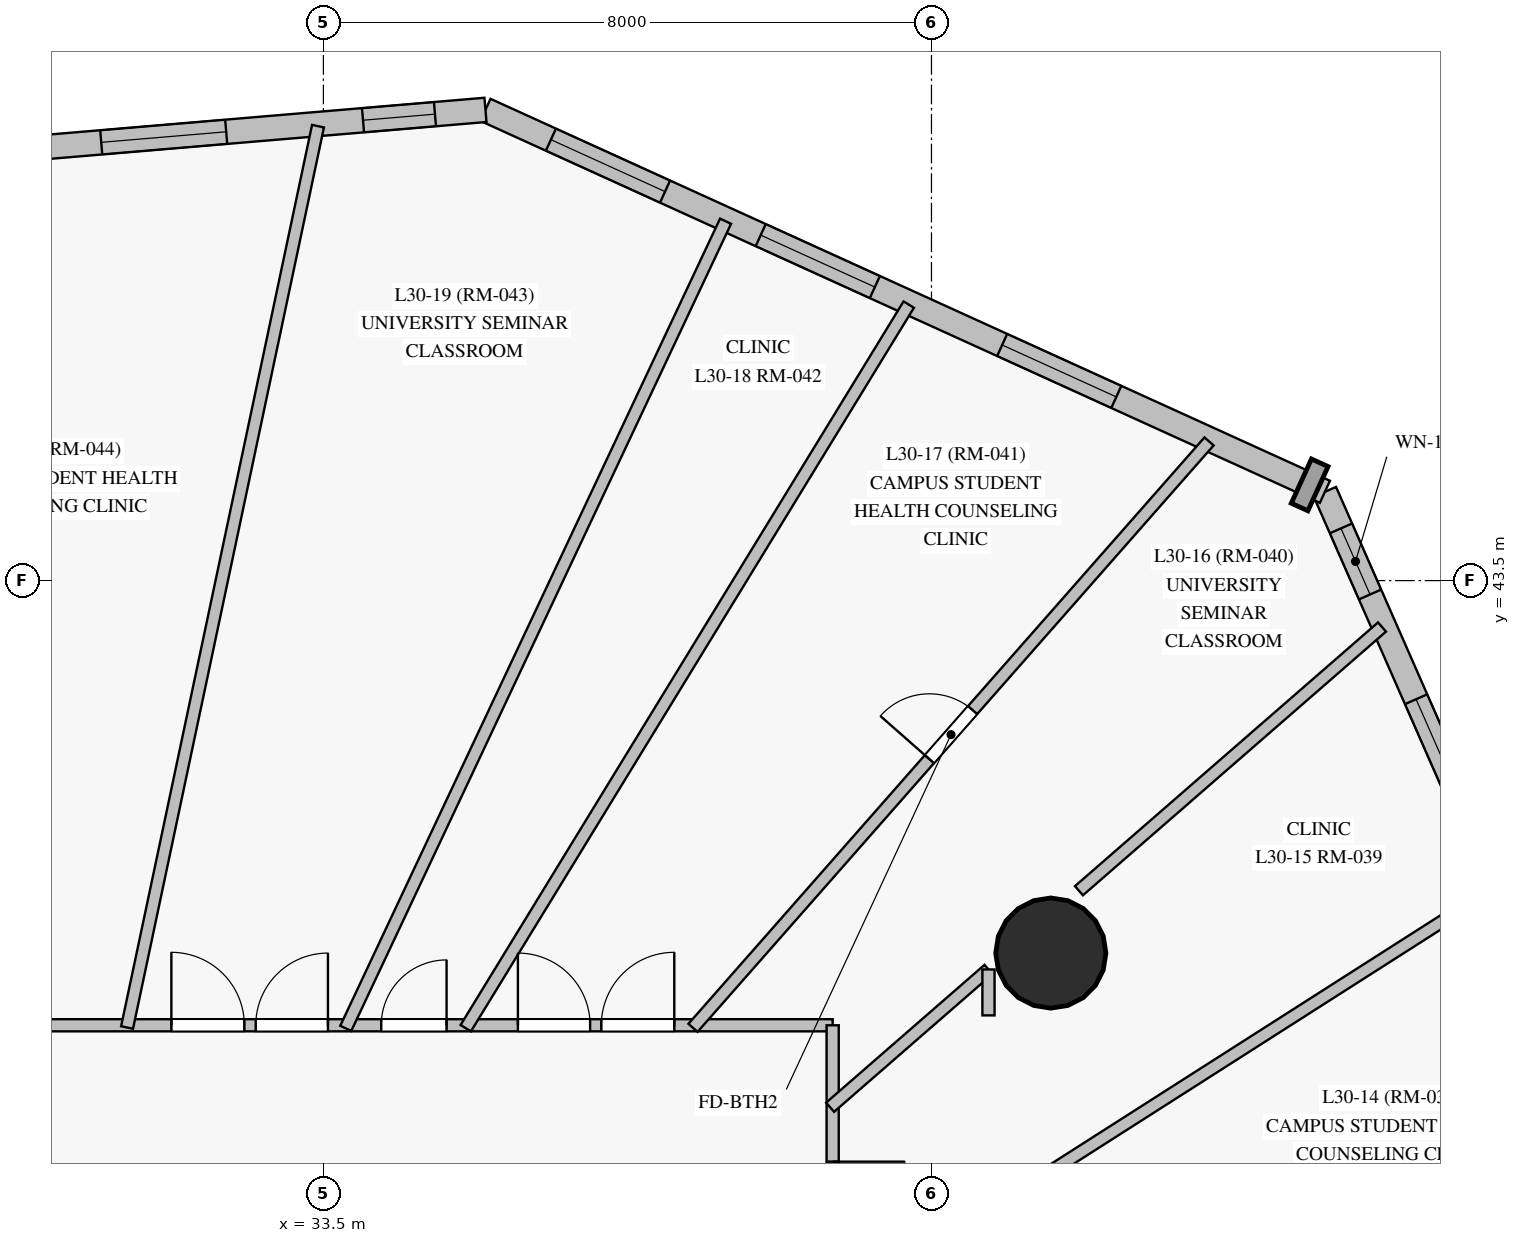
"""IFC4 building model, lengths in metres.
Left out: names, types, materials, properties, quantities, classifications, styles, units other than length and angle.
Written with IfcOpenShell. Run it as: python <this file> out.ifc"""

import sys

from ifc_helpers import new_model, si_unit, direction, frame, frame_2d, origin, origin_with_axes, origin_2d, place, context, subcontext, project, spatial, rectangle, circle, extrude, source, transform, mapped, element, fill, save


model = new_model("IFC4")
c1 = context("Model", 3, precision=1e-05, world=origin(), true_north=direction((0.0, 1.0)))
c2 = subcontext(c1, "Body", "Model", "MODEL_VIEW")
j1 = project(units=[si_unit("LENGTHUNIT", "METRE"), si_unit("PLANEANGLEUNIT", "RADIAN")], contexts=[c1])
p1 = place(None, origin())
s1 = spatial("IfcSite", under=j1, at=p1, CompositionType="ELEMENT")
p2 = place(p1, origin())
s2 = spatial("IfcBuilding", under=s1, at=p2, CompositionType="ELEMENT")
p3 = place(p2, frame((0.0, 0.0, 111.45)))
s3 = spatial("IfcBuildingStorey", under=s2, at=p3, CompositionType="ELEMENT", Elevation=111.45)
m1 = source(origin_with_axes(), c2, "Body", "SweptSolid", [
    extrude(circle(Radius=0.725, at=origin_2d()), origin(), (0.0, 0.0, 1.0), 3.05),
])
p4 = place(p3, frame((43.07, 38.6, 0.0), z_axis=(0.0, 0.0, 1.0), x_axis=(1.0, 0.0, 0.0)))
e1 = element("IfcColumn", 1, at=p4, inside=s3, PredefinedType="COLUMN", context=c2, shape_type="MappedRepresentation", body=[
    mapped(m1, transform((0.0, 0.0, 0.0), scale=1.0)),
])
p5 = place(p3, frame((50.588, 35.769, 0.0), z_axis=(0.0, 0.0, 1.0), x_axis=(-0.402455807278, 0.915439415357, 0.0)))
e2 = element("IfcWall", 2, at=p5, inside=s3, PredefinedType="SOLIDWALL", context=c2, shape_type="SweptSolid", body=[
    extrude(rectangle(XDim=9.721, YDim=0.32, at=frame_2d((4.861, 0.0))), origin(), (0.0, 0.0, 1.0), 2.825),
])
p6 = place(p5, frame((1.23, 0.0, 0.85)))
e3 = element("IfcOpeningElement", 3, at=p6, cuts=e2, PredefinedType="OPENING", context=c2, shape_type="SweptSolid", body=[
    extrude(rectangle(XDim=1.65, YDim=1.65, at=frame_2d((0.825, 0.825))), frame((0.0, 0.17, 0.0), z_axis=(0.0, -1.0, 0.0), x_axis=(1.0, 0.0, 0.0)), (0.0, 0.0, 1.0), 0.34),
])
p7 = place(p5, frame((5.09, 0.0, 0.85)))
e4 = element("IfcOpeningElement", 4, at=p7, cuts=e2, PredefinedType="OPENING", context=c2, shape_type="SweptSolid", body=[
    extrude(rectangle(XDim=1.65, YDim=1.65, at=frame_2d((0.825, 0.825))), frame((0.0, 0.17, 0.0), z_axis=(0.0, -1.0, 0.0), x_axis=(1.0, 0.0, 0.0)), (0.0, 0.0, 1.0), 0.34),
])
p8 = place(p5, frame((8.246, 0.0, 0.85)))
e5 = element("IfcOpeningElement", 5, at=p8, cuts=e2, PredefinedType="OPENING", context=c2, shape_type="SweptSolid", body=[
    extrude(rectangle(XDim=0.95, YDim=1.5, at=frame_2d((0.475, 0.75))), frame((0.0, 0.17, 0.0), z_axis=(0.0, -1.0, 0.0), x_axis=(1.0, 0.0, 0.0)), (0.0, 0.0, 1.0), 0.34),
])
p9 = place(p3, frame((46.676, 44.668, 0.0), z_axis=(0.0, 0.0, 1.0), x_axis=(-0.910221705095, 0.414121295726, 0.0)))
e6 = element("IfcWall", 6, at=p9, inside=s3, PredefinedType="SOLIDWALL", context=c2, shape_type="SweptSolid", body=[
    extrude(rectangle(XDim=12.133, YDim=0.32, at=frame_2d((6.066, 0.0))), origin(), (0.0, 0.0, 1.0), 2.825),
])
p10 = place(p9, frame((3.015, 0.0, 0.85)))
e7 = element("IfcOpeningElement", 7, at=p10, cuts=e6, PredefinedType="OPENING", context=c2, shape_type="SweptSolid", body=[
    extrude(rectangle(XDim=1.65, YDim=1.65, at=frame_2d((0.825, 0.825))), frame((0.0, 0.17, 0.0), z_axis=(0.0, -1.0, 0.0), x_axis=(1.0, 0.0, 0.0)), (0.0, 0.0, 1.0), 0.34),
])
p11 = place(p9, frame((6.505, 0.0, 0.85)))
e8 = element("IfcOpeningElement", 8, at=p11, cuts=e6, PredefinedType="OPENING", context=c2, shape_type="SweptSolid", body=[
    extrude(rectangle(XDim=1.65, YDim=1.65, at=frame_2d((0.825, 0.825))), frame((0.0, 0.17, 0.0), z_axis=(0.0, -1.0, 0.0), x_axis=(1.0, 0.0, 0.0)), (0.0, 0.0, 1.0), 0.34),
])
p12 = place(p9, frame((9.537, 0.0, 0.85)))
e9 = element("IfcOpeningElement", 9, at=p12, cuts=e6, PredefinedType="OPENING", context=c2, shape_type="SweptSolid", body=[
    extrude(rectangle(XDim=1.65, YDim=1.65, at=frame_2d((0.825, 0.825))), frame((0.0, 0.17, 0.0), z_axis=(0.0, -1.0, 0.0), x_axis=(1.0, 0.0, 0.0)), (0.0, 0.0, 1.0), 0.34),
])
p13 = place(p3, frame((35.632, 49.693, 0.0), z_axis=(0.0, 0.0, 1.0), x_axis=(-0.996452673848, -0.084155028263, 0.0)))
e10 = element("IfcWall", 10, at=p13, inside=s3, PredefinedType="SOLIDWALL", context=c2, shape_type="SweptSolid", body=[
    extrude(rectangle(XDim=9.742, YDim=0.32, at=frame_2d((4.871, 0.0))), origin(), (0.0, 0.0, 1.0), 2.825),
])
p14 = place(p13, frame((0.667, 0.0, 0.85)))
e11 = element("IfcOpeningElement", 11, at=p14, cuts=e10, PredefinedType="OPENING", context=c2, shape_type="SweptSolid", body=[
    extrude(rectangle(XDim=0.95, YDim=1.5, at=frame_2d((0.475, 0.75))), frame((0.0, 0.17, 0.0), z_axis=(0.0, -1.0, 0.0), x_axis=(1.0, 0.0, 0.0)), (0.0, 0.0, 1.0), 0.34),
])
p15 = place(p13, frame((3.423, 0.0, 0.85)))
e12 = element("IfcOpeningElement", 12, at=p15, cuts=e10, PredefinedType="OPENING", context=c2, shape_type="SweptSolid", body=[
    extrude(rectangle(XDim=1.65, YDim=1.65, at=frame_2d((0.825, 0.825))), frame((0.0, 0.17, 0.0), z_axis=(0.0, -1.0, 0.0), x_axis=(1.0, 0.0, 0.0)), (0.0, 0.0, 1.0), 0.34),
])
p16 = place(p13, frame((6.833, 0.0, 0.85)))
e13 = element("IfcOpeningElement", 13, at=p16, cuts=e10, PredefinedType="OPENING", context=c2, shape_type="SweptSolid", body=[
    extrude(rectangle(XDim=1.65, YDim=1.65, at=frame_2d((0.825, 0.825))), frame((0.0, 0.17, 0.0), z_axis=(0.0, -1.0, 0.0), x_axis=(1.0, 0.0, 0.0)), (0.0, 0.0, 1.0), 0.34),
])
p17 = place(p3, frame((16.7, 37.65, 0.0), z_axis=(0.0, 0.0, 1.0), x_axis=(1.0, 0.0, 0.0)))
e14 = element("IfcWall", 14, at=p17, inside=s3, PredefinedType="PARTITIONING", context=c2, shape_type="SweptSolid", body=[
    extrude(rectangle(XDim=23.5, YDim=0.16, at=frame_2d((11.75, 0.0))), origin(), (0.0, 0.0, 1.0), 2.325),
])
p18 = place(p17, frame((20.456, 0.0, 0.0)))
e15 = element("IfcOpeningElement", 15, at=p18, cuts=e14, PredefinedType="OPENING", context=c2, shape_type="SweptSolid", body=[
    extrude(rectangle(XDim=0.96, YDim=2.15, at=frame_2d((0.48, 1.075))), frame((0.0, 0.09, 0.0), z_axis=(0.0, -1.0, 0.0), x_axis=(1.0, 0.0, 0.0)), (0.0, 0.0, 1.0), 0.18),
])
p19 = place(p17, frame((19.359, 0.0, 0.0)))
e16 = element("IfcOpeningElement", 16, at=p19, cuts=e14, PredefinedType="OPENING", context=c2, shape_type="SweptSolid", body=[
    extrude(rectangle(XDim=0.95, YDim=2.15, at=frame_2d((0.475, 1.075))), frame((0.0, 0.09, 0.0), z_axis=(0.0, -1.0, 0.0), x_axis=(1.0, 0.0, 0.0)), (0.0, 0.0, 1.0), 0.18),
])
p20 = place(p17, frame((15.91, 0.0, 0.0)))
e17 = element("IfcOpeningElement", 17, at=p20, cuts=e14, PredefinedType="OPENING", context=c2, shape_type="SweptSolid", body=[
    extrude(rectangle(XDim=0.95, YDim=2.15, at=frame_2d((0.475, 1.075))), frame((0.0, 0.09, 0.0), z_axis=(0.0, -1.0, 0.0), x_axis=(1.0, 0.0, 0.0)), (0.0, 0.0, 1.0), 0.18),
])
p21 = place(p17, frame((14.8, 0.0, 0.0)))
e18 = element("IfcOpeningElement", 18, at=p21, cuts=e14, PredefinedType="OPENING", context=c2, shape_type="SweptSolid", body=[
    extrude(rectangle(XDim=0.96, YDim=2.15, at=frame_2d((0.48, 1.075))), frame((0.0, 0.09, 0.0), z_axis=(0.0, -1.0, 0.0), x_axis=(1.0, 0.0, 0.0)), (0.0, 0.0, 1.0), 0.18),
])
p22 = place(p17, frame((11.365, 0.0, 0.0)))
e19 = element("IfcOpeningElement", 19, at=p22, cuts=e14, PredefinedType="OPENING", context=c2, shape_type="SweptSolid", body=[
    extrude(rectangle(XDim=0.95, YDim=2.15, at=frame_2d((0.475, 1.075))), frame((0.0, 0.09, 0.0), z_axis=(0.0, -1.0, 0.0), x_axis=(1.0, 0.0, 0.0)), (0.0, 0.0, 1.0), 0.18),
])
p23 = place(p17, frame((7.75, 0.0, 0.0)))
e20 = element("IfcOpeningElement", 20, at=p23, cuts=e14, PredefinedType="OPENING", context=c2, shape_type="SweptSolid", body=[
    extrude(rectangle(XDim=0.96, YDim=2.15, at=frame_2d((0.48, 1.075))), frame((0.0, 0.09, 0.0), z_axis=(0.0, -1.0, 0.0), x_axis=(1.0, 0.0, 0.0)), (0.0, 0.0, 1.0), 0.18),
])
p24 = place(p17, frame((2.94, 0.0, 0.0)))
e21 = element("IfcOpeningElement", 21, at=p24, cuts=e14, PredefinedType="OPENING", context=c2, shape_type="SweptSolid", body=[
    extrude(rectangle(XDim=0.95, YDim=2.15, at=frame_2d((0.475, 1.075))), frame((0.0, 0.09, 0.0), z_axis=(0.0, -1.0, 0.0), x_axis=(1.0, 0.0, 0.0)), (0.0, 0.0, 1.0), 0.18),
])
p25 = place(p17, frame((17.561, 0.0, 0.0)))
e22 = element("IfcOpeningElement", 22, at=p25, cuts=e14, PredefinedType="OPENING", context=c2, shape_type="SweptSolid", body=[
    extrude(rectangle(XDim=0.86, YDim=2.04, at=frame_2d((0.43, 1.02))), frame((0.0, 0.09, 0.0), z_axis=(0.0, -1.0, 0.0), x_axis=(1.0, 0.0, 0.0)), (0.0, 0.0, 1.0), 0.18),
])
p26 = place(p3, frame((40.2, 37.65, 0.0), z_axis=(0.0, 0.0, 1.0), x_axis=(0.0, -1.0, 0.0)))
e23 = element("IfcWall", 23, at=p26, inside=s3, PredefinedType="PARTITIONING", context=c2, shape_type="SweptSolid", body=[
    extrude(rectangle(XDim=22.3, YDim=0.16, at=frame_2d((11.15, 0.0))), origin(), (0.0, 0.0, 1.0), 2.325),
])
p27 = place(p26, frame((14.02, 0.0, 0.0)))
e24 = element("IfcOpeningElement", 24, at=p27, cuts=e23, PredefinedType="OPENING", context=c2, shape_type="SweptSolid", body=[
    extrude(rectangle(XDim=0.95, YDim=2.15, at=frame_2d((0.475, 1.075))), frame((0.0, 0.09, 0.0), z_axis=(0.0, -1.0, 0.0), x_axis=(1.0, 0.0, 0.0)), (0.0, 0.0, 1.0), 0.18),
])
p28 = place(p26, frame((10.675, 0.0, 0.0)))
e25 = element("IfcOpeningElement", 25, at=p28, cuts=e23, PredefinedType="OPENING", context=c2, shape_type="SweptSolid", body=[
    extrude(rectangle(XDim=0.95, YDim=2.15, at=frame_2d((0.475, 1.075))), frame((0.0, 0.09, 0.0), z_axis=(0.0, -1.0, 0.0), x_axis=(1.0, 0.0, 0.0)), (0.0, 0.0, 1.0), 0.18),
])
p29 = place(p26, frame((7.33, 0.0, 0.0)))
e26 = element("IfcOpeningElement", 26, at=p29, cuts=e23, PredefinedType="OPENING", context=c2, shape_type="SweptSolid", body=[
    extrude(rectangle(XDim=0.96, YDim=2.15, at=frame_2d((0.48, 1.075))), frame((0.0, 0.09, 0.0), z_axis=(0.0, -1.0, 0.0), x_axis=(1.0, 0.0, 0.0)), (0.0, 0.0, 1.0), 0.18),
])
p30 = place(p26, frame((5.01, 0.0, 0.0)))
e27 = element("IfcOpeningElement", 27, at=p30, cuts=e23, PredefinedType="OPENING", context=c2, shape_type="SweptSolid", body=[
    extrude(rectangle(XDim=0.95, YDim=2.15, at=frame_2d((0.475, 1.075))), frame((0.0, 0.09, 0.0), z_axis=(0.0, -1.0, 0.0), x_axis=(1.0, 0.0, 0.0)), (0.0, 0.0, 1.0), 0.18),
])
p31 = place(p26, frame((1.794, 0.0, 0.0)))
e28 = element("IfcOpeningElement", 28, at=p31, cuts=e23, PredefinedType="OPENING", context=c2, shape_type="SweptSolid", body=[
    extrude(rectangle(XDim=0.95, YDim=2.15, at=frame_2d((0.475, 1.075))), frame((0.0, 0.09, 0.0), z_axis=(0.0, -1.0, 0.0), x_axis=(1.0, 0.0, 0.0)), (0.0, 0.0, 1.0), 0.18),
])
p32 = place(p3, frame((30.917, 37.621, 0.0), z_axis=(0.0, 0.0, 1.0), x_axis=(0.207235529674, 0.978291078995, 0.0)))
e29 = element("IfcWall", 29, at=p32, inside=s3, PredefinedType="PARTITIONING", context=c2, shape_type="SweptSolid", body=[
    extrude(rectangle(XDim=12.121, YDim=0.16, at=frame_2d((6.061, 0.0))), origin(), (0.0, 0.0, 1.0), 2.825),
])
p33 = place(p3, frame((33.794, 37.609, 0.0), z_axis=(0.0, 0.0, 1.0), x_axis=(0.425784012036, 0.904824831166, 0.0)))
e30 = element("IfcWall", 30, at=p33, inside=s3, PredefinedType="PARTITIONING", context=c2, shape_type="SweptSolid", body=[
    extrude(rectangle(XDim=11.736, YDim=0.16, at=frame_2d((5.868, 0.0))), origin(), (0.0, 0.0, 1.0), 2.825),
])
p34 = place(p3, frame((35.373, 37.612, 0.0), z_axis=(0.0, 0.0, 1.0), x_axis=(0.522127560248, 0.852867405186, 0.0)))
e31 = element("IfcWall", 31, at=p34, inside=s3, PredefinedType="PARTITIONING", context=c2, shape_type="SweptSolid", body=[
    extrude(rectangle(XDim=11.162, YDim=0.16, at=frame_2d((5.581, 0.0))), origin(), (0.0, 0.0, 1.0), 2.825),
])
p35 = place(p3, frame((40.175, 33.881, 0.0), z_axis=(0.0, 0.0, 1.0), x_axis=(0.842904976607, 0.53806245029, 0.0)))
e32 = element("IfcWall", 32, at=p35, inside=s3, PredefinedType="PARTITIONING", context=c2, shape_type="SweptSolid", body=[
    extrude(rectangle(XDim=10.39, YDim=0.16, at=frame_2d((5.195, 0.0))), origin(), (0.0, 0.0, 1.0), 2.825),
])
p36 = place(p3, frame((38.363, 37.616, 0.0), z_axis=(0.0, 0.0, 1.0), x_axis=(0.660641283191, 0.750701735008, 0.0)))
e33 = element("IfcWall", 33, at=p36, inside=s3, PredefinedType="PARTITIONING", context=c2, shape_type="SweptSolid", body=[
    extrude(rectangle(XDim=10.277, YDim=0.16, at=frame_2d((5.138, 0.0))), origin(), (0.0, 0.0, 1.0), 2.825),
])
p37 = place(p36, frame((4.708, 0.0, 0.0)))
e34 = element("IfcOpeningElement", 34, at=p37, cuts=e33, PredefinedType="OPENING", context=c2, shape_type="SweptSolid", body=[
    extrude(rectangle(XDim=0.86, YDim=2.04, at=frame_2d((0.43, 1.02))), frame((0.0, 0.09, 0.0), z_axis=(0.0, -1.0, 0.0), x_axis=(1.0, 0.0, 0.0)), (0.0, 0.0, 1.0), 0.18),
])
p38 = place(p3, frame((43.44, 39.42, 0.0), z_axis=(0.0, 0.0, 1.0), x_axis=(0.754393669879, 0.656422265654, 0.0)))
e35 = element("IfcWall", 35, at=p38, inside=s3, PredefinedType="PARTITIONING", context=c2, shape_type="SweptSolid", body=[
    extrude(rectangle(XDim=5.285, YDim=0.16, at=frame_2d((2.643, 0.0))), origin(), (0.0, 0.0, 1.0), 2.825),
])
p39 = place(p3, frame((40.166, 36.571, 0.0), z_axis=(0.0, 0.0, 1.0), x_axis=(0.754413317587, 0.656399684831, 0.0)))
e36 = element("IfcWall", 36, at=p39, inside=s3, PredefinedType="PARTITIONING", context=c2, shape_type="SweptSolid", body=[
    extrude(rectangle(XDim=2.762, YDim=0.16, at=frame_2d((1.381, 0.0))), origin(), (0.0, 0.0, 1.0), 2.225),
])
p40 = place(p3, frame((42.25, 38.385, 0.0), z_axis=(0.0, 0.0, 1.0), x_axis=(0.0, -1.0, 0.0)))
e37 = element("IfcWall", 37, at=p40, inside=s3, PredefinedType="PARTITIONING", context=c2, shape_type="SweptSolid", body=[
    extrude(rectangle(XDim=0.604, YDim=0.16, at=frame_2d((0.302, 0.0))), origin(), (0.0, 0.0, 1.0), 2.325),
])
m2 = source(origin_with_axes(), c2, "Body", "SweptSolid", [
    extrude(rectangle(XDim=1.65, YDim=1.65, at=frame_2d((0.825, 0.825))), frame((0.0, 0.03, 0.0), z_axis=(0.0, -1.0, 0.0), x_axis=(1.0, 0.0, 0.0)), (0.0, 0.0, 1.0), 0.06),
])
p41 = place(p7, origin())
e38 = element("IfcWindow", 38, at=p41, inside=s3, PartitioningType="SINGLE_PANEL", PredefinedType="WINDOW", context=c2, shape_type="MappedRepresentation", body=[
    mapped(m2, transform((0.0, 0.0, 0.0), scale=1.0)),
])
fill(e4, e38)
m3 = source(origin_with_axes(), c2, "Body", "SweptSolid", [
    extrude(rectangle(XDim=0.95, YDim=1.5, at=frame_2d((0.475, 0.75))), frame((0.0, 0.03, 0.0), z_axis=(0.0, -1.0, 0.0), x_axis=(1.0, 0.0, 0.0)), (0.0, 0.0, 1.0), 0.06),
])
p42 = place(p8, origin())
e39 = element("IfcWindow", 39, at=p42, inside=s3, PartitioningType="SINGLE_PANEL", PredefinedType="WINDOW", context=c2, shape_type="MappedRepresentation", body=[
    mapped(m3, transform((0.0, 0.0, 0.0), scale=1.0)),
])
fill(e5, e39)
p43 = place(p10, origin())
e40 = element("IfcWindow", 40, at=p43, inside=s3, PartitioningType="SINGLE_PANEL", PredefinedType="WINDOW", context=c2, shape_type="MappedRepresentation", body=[
    mapped(m2, transform((0.0, 0.0, 0.0), scale=1.0)),
])
fill(e7, e40)
p44 = place(p11, origin())
e41 = element("IfcWindow", 41, at=p44, inside=s3, PartitioningType="SINGLE_PANEL", PredefinedType="WINDOW", context=c2, shape_type="MappedRepresentation", body=[
    mapped(m2, transform((0.0, 0.0, 0.0), scale=1.0)),
])
fill(e8, e41)
p45 = place(p12, origin())
e42 = element("IfcWindow", 42, at=p45, inside=s3, PartitioningType="SINGLE_PANEL", PredefinedType="WINDOW", context=c2, shape_type="MappedRepresentation", body=[
    mapped(m2, transform((0.0, 0.0, 0.0), scale=1.0)),
])
fill(e9, e42)
p46 = place(p14, origin())
e43 = element("IfcWindow", 43, at=p46, inside=s3, PartitioningType="SINGLE_PANEL", PredefinedType="WINDOW", context=c2, shape_type="MappedRepresentation", body=[
    mapped(m3, transform((0.0, 0.0, 0.0), scale=1.0)),
])
fill(e11, e43)
p47 = place(p15, origin())
e44 = element("IfcWindow", 44, at=p47, inside=s3, PartitioningType="SINGLE_PANEL", PredefinedType="WINDOW", context=c2, shape_type="MappedRepresentation", body=[
    mapped(m2, transform((0.0, 0.0, 0.0), scale=1.0)),
])
fill(e12, e44)
m4 = source(origin_with_axes(), c2, "Body", "SweptSolid", [
    extrude(rectangle(XDim=0.95, YDim=2.15, at=frame_2d((0.475, 1.075))), frame((0.0, 0.025, 0.0), z_axis=(0.0, -1.0, 0.0), x_axis=(1.0, 0.0, 0.0)), (0.0, 0.0, 1.0), 0.05),
])
p48 = place(p31, origin())
e45 = element("IfcDoor", 45, at=p48, inside=s3, OperationType="SINGLE_SWING_LEFT", PredefinedType="DOOR", context=c2, shape_type="MappedRepresentation", body=[
    mapped(m4, transform((0.0, 0.0, 0.0), scale=1.0)),
])
fill(e28, e45)
m5 = source(origin_with_axes(), c2, "Body", "SweptSolid", [
    extrude(rectangle(XDim=0.96, YDim=2.15, at=frame_2d((0.48, 1.075))), frame((0.0, 0.025, 0.0), z_axis=(0.0, -1.0, 0.0), x_axis=(1.0, 0.0, 0.0)), (0.0, 0.0, 1.0), 0.05),
])
p49 = place(p18, origin())
e46 = element("IfcDoor", 46, at=p49, inside=s3, OperationType="SINGLE_SWING_RIGHT", PredefinedType="DOOR", context=c2, shape_type="MappedRepresentation", body=[
    mapped(m5, transform((0.0, 0.0, 0.0), scale=1.0)),
])
fill(e15, e46)
p50 = place(p19, origin())
e47 = element("IfcDoor", 47, at=p50, inside=s3, OperationType="SINGLE_SWING_LEFT", PredefinedType="DOOR", context=c2, shape_type="MappedRepresentation", body=[
    mapped(m4, transform((0.0, 0.0, 0.0), scale=1.0)),
])
fill(e16, e47)
p51 = place(p20, origin())
e48 = element("IfcDoor", 48, at=p51, inside=s3, OperationType="SINGLE_SWING_RIGHT", PredefinedType="DOOR", context=c2, shape_type="MappedRepresentation", body=[
    mapped(m4, transform((0.0, 0.0, 0.0), scale=1.0)),
])
fill(e17, e48)
p52 = place(p21, origin())
e49 = element("IfcDoor", 49, at=p52, inside=s3, OperationType="SINGLE_SWING_LEFT", PredefinedType="DOOR", context=c2, shape_type="MappedRepresentation", body=[
    mapped(m5, transform((0.0, 0.0, 0.0), scale=1.0)),
])
fill(e18, e49)
m6 = source(origin_with_axes(), c2, "Body", "SweptSolid", [
    extrude(rectangle(XDim=0.86, YDim=2.04, at=frame_2d((0.43, 1.02))), frame((0.0, 0.025, 0.0), z_axis=(0.0, -1.0, 0.0), x_axis=(1.0, 0.0, 0.0)), (0.0, 0.0, 1.0), 0.05),
])
p53 = place(p37, origin())
e50 = element("IfcDoor", 50, at=p53, inside=s3, OperationType="SINGLE_SWING_LEFT", PredefinedType="DOOR", context=c2, shape_type="MappedRepresentation", body=[
    mapped(m6, transform((0.0, 0.0, 0.0), scale=1.0)),
])
fill(e34, e50)
p54 = place(p25, origin())
e51 = element("IfcDoor", 51, at=p54, inside=s3, OperationType="SINGLE_SWING_RIGHT", PredefinedType="DOOR", context=c2, shape_type="MappedRepresentation", body=[
    mapped(m6, transform((0.0, 0.0, 0.0), scale=1.0)),
])
fill(e22, e51)
save(model, sys.argv[1])
